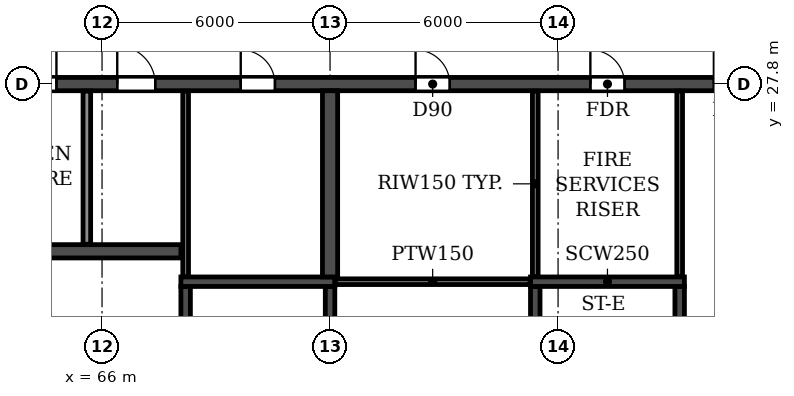
"""IFC4 building model, lengths in metres.
Left out: names, types, materials, properties, quantities, classifications, styles, units other than length and angle.
Written with IfcOpenShell. Run it as: python <this file> out.ifc"""

import sys

from ifc_helpers import new_model, si_unit, direction, frame, frame_2d, origin, place, context, subcontext, project, spatial, rectangle, extrude, element, fill, save


model = new_model("IFC4")
c1 = context("Model", 3, precision=1e-05, world=origin(), true_north=direction((0.0, 1.0)))
c2 = subcontext(c1, "Body", "Model", "MODEL_VIEW")
j1 = project(units=[si_unit("LENGTHUNIT", "METRE"), si_unit("PLANEANGLEUNIT", "RADIAN")], contexts=[c1])
p1 = place(None, origin())
s1 = spatial("IfcSite", under=j1, at=p1, CompositionType="ELEMENT")
p2 = place(p1, origin())
s2 = spatial("IfcBuilding", under=s1, at=p2, CompositionType="ELEMENT")
p3 = place(p2, frame((0.0, 0.0, 261.0)))
s3 = spatial("IfcBuildingStorey", under=s2, at=p3, CompositionType="ELEMENT", Elevation=261.0)
p4 = place(p3, frame((18.2, 27.8, 0.0), z_axis=(0.0, 0.0, 1.0), x_axis=(1.0, 0.0, 0.0)))
e1 = element("IfcWall", 1, at=p4, inside=s3, PredefinedType="SOLIDWALL", context=c2, shape_type="SweptSolid", body=[
    extrude(rectangle(XDim=65.6, YDim=0.35, at=frame_2d((32.8, 0.0))), origin(), (0.0, 0.0, 1.0), 5.7),
])
p5 = place(p4, frame((0.7, 0.0, 0.0)))
e2 = element("IfcOpeningElement", 2, at=p5, cuts=e1, PredefinedType="OPENING", context=c2, shape_type="SweptSolid", body=[
    extrude(rectangle(XDim=1.0, YDim=2.1, at=frame_2d((0.5, 1.05))), frame((0.0, 0.185, 0.0), z_axis=(0.0, -1.0, 0.0), x_axis=(1.0, 0.0, 0.0)), (0.0, 0.0, 1.0), 0.37),
])
p6 = place(p4, frame((4.05, 0.0, 0.0)))
e3 = element("IfcOpeningElement", 3, at=p6, cuts=e1, PredefinedType="OPENING", context=c2, shape_type="SweptSolid", body=[
    extrude(rectangle(XDim=0.9, YDim=2.1, at=frame_2d((0.45, 1.05))), frame((0.0, 0.185, 0.0), z_axis=(0.0, -1.0, 0.0), x_axis=(1.0, 0.0, 0.0)), (0.0, 0.0, 1.0), 0.37),
])
p7 = place(p4, frame((8.65, 0.0, 0.0)))
e4 = element("IfcOpeningElement", 4, at=p7, cuts=e1, PredefinedType="OPENING", context=c2, shape_type="SweptSolid", body=[
    extrude(rectangle(XDim=0.9, YDim=2.1, at=frame_2d((0.45, 1.05))), frame((0.0, 0.185, 0.0), z_axis=(0.0, -1.0, 0.0), x_axis=(1.0, 0.0, 0.0)), (0.0, 0.0, 1.0), 0.37),
])
p8 = place(p4, frame((13.25, 0.0, 0.0)))
e5 = element("IfcOpeningElement", 5, at=p8, cuts=e1, PredefinedType="OPENING", context=c2, shape_type="SweptSolid", body=[
    extrude(rectangle(XDim=0.9, YDim=2.1, at=frame_2d((0.45, 1.05))), frame((0.0, 0.185, 0.0), z_axis=(0.0, -1.0, 0.0), x_axis=(1.0, 0.0, 0.0)), (0.0, 0.0, 1.0), 0.37),
])
p9 = place(p4, frame((16.4, 0.0, 0.0)))
e6 = element("IfcOpeningElement", 6, at=p9, cuts=e1, PredefinedType="OPENING", context=c2, shape_type="SweptSolid", body=[
    extrude(rectangle(XDim=1.0, YDim=2.1, at=frame_2d((0.5, 1.05))), frame((0.0, 0.185, 0.0), z_axis=(0.0, -1.0, 0.0), x_axis=(1.0, 0.0, 0.0)), (0.0, 0.0, 1.0), 0.37),
])
p10 = place(p4, frame((21.6, 0.0, 0.0)))
e7 = element("IfcOpeningElement", 7, at=p10, cuts=e1, PredefinedType="OPENING", context=c2, shape_type="SweptSolid", body=[
    extrude(rectangle(XDim=1.0, YDim=2.1, at=frame_2d((0.5, 1.05))), frame((0.0, 0.185, 0.0), z_axis=(0.0, -1.0, 0.0), x_axis=(1.0, 0.0, 0.0)), (0.0, 0.0, 1.0), 0.37),
])
p11 = place(p4, frame((29.4, 0.0, 0.0)))
e8 = element("IfcOpeningElement", 8, at=p11, cuts=e1, PredefinedType="OPENING", context=c2, shape_type="SweptSolid", body=[
    extrude(rectangle(XDim=1.0, YDim=2.1, at=frame_2d((0.5, 1.05))), frame((0.0, 0.185, 0.0), z_axis=(0.0, -1.0, 0.0), x_axis=(1.0, 0.0, 0.0)), (0.0, 0.0, 1.0), 0.37),
])
p12 = place(p4, frame((32.3, 0.0, 0.0)))
e9 = element("IfcOpeningElement", 9, at=p12, cuts=e1, PredefinedType="OPENING", context=c2, shape_type="SweptSolid", body=[
    extrude(rectangle(XDim=1.0, YDim=2.1, at=frame_2d((0.5, 1.05))), frame((0.0, 0.185, 0.0), z_axis=(0.0, -1.0, 0.0), x_axis=(1.0, 0.0, 0.0)), (0.0, 0.0, 1.0), 0.37),
])
p13 = place(p4, frame((35.2, 0.0, 0.0)))
e10 = element("IfcOpeningElement", 10, at=p13, cuts=e1, PredefinedType="OPENING", context=c2, shape_type="SweptSolid", body=[
    extrude(rectangle(XDim=1.0, YDim=2.1, at=frame_2d((0.5, 1.05))), frame((0.0, 0.185, 0.0), z_axis=(0.0, -1.0, 0.0), x_axis=(1.0, 0.0, 0.0)), (0.0, 0.0, 1.0), 0.37),
])
p14 = place(p4, frame((37.8, 0.0, 0.0)))
e11 = element("IfcOpeningElement", 11, at=p14, cuts=e1, PredefinedType="OPENING", context=c2, shape_type="SweptSolid", body=[
    extrude(rectangle(XDim=1.0, YDim=2.1, at=frame_2d((0.5, 1.05))), frame((0.0, 0.185, 0.0), z_axis=(0.0, -1.0, 0.0), x_axis=(1.0, 0.0, 0.0)), (0.0, 0.0, 1.0), 0.37),
])
p15 = place(p4, frame((41.7, 0.0, 0.0)))
e12 = element("IfcOpeningElement", 12, at=p15, cuts=e1, PredefinedType="OPENING", context=c2, shape_type="SweptSolid", body=[
    extrude(rectangle(XDim=1.0, YDim=2.1, at=frame_2d((0.5, 1.05))), frame((0.0, 0.185, 0.0), z_axis=(0.0, -1.0, 0.0), x_axis=(1.0, 0.0, 0.0)), (0.0, 0.0, 1.0), 0.37),
])
p16 = place(p4, frame((45.6, 0.0, 0.0)))
e13 = element("IfcOpeningElement", 13, at=p16, cuts=e1, PredefinedType="OPENING", context=c2, shape_type="SweptSolid", body=[
    extrude(rectangle(XDim=1.0, YDim=2.1, at=frame_2d((0.5, 1.05))), frame((0.0, 0.185, 0.0), z_axis=(0.0, -1.0, 0.0), x_axis=(1.0, 0.0, 0.0)), (0.0, 0.0, 1.0), 0.37),
])
p17 = place(p4, frame((48.2, 0.0, 0.0)))
e14 = element("IfcOpeningElement", 14, at=p17, cuts=e1, PredefinedType="OPENING", context=c2, shape_type="SweptSolid", body=[
    extrude(rectangle(XDim=1.0, YDim=2.1, at=frame_2d((0.5, 1.05))), frame((0.0, 0.185, 0.0), z_axis=(0.0, -1.0, 0.0), x_axis=(1.0, 0.0, 0.0)), (0.0, 0.0, 1.0), 0.37),
])
p18 = place(p4, frame((51.45, 0.0, 0.0)))
e15 = element("IfcOpeningElement", 15, at=p18, cuts=e1, PredefinedType="OPENING", context=c2, shape_type="SweptSolid", body=[
    extrude(rectangle(XDim=0.9, YDim=2.1, at=frame_2d((0.45, 1.05))), frame((0.0, 0.185, 0.0), z_axis=(0.0, -1.0, 0.0), x_axis=(1.0, 0.0, 0.0)), (0.0, 0.0, 1.0), 0.37),
])
p19 = place(p4, frame((56.05, 0.0, 0.0)))
e16 = element("IfcOpeningElement", 16, at=p19, cuts=e1, PredefinedType="OPENING", context=c2, shape_type="SweptSolid", body=[
    extrude(rectangle(XDim=0.9, YDim=2.1, at=frame_2d((0.45, 1.05))), frame((0.0, 0.185, 0.0), z_axis=(0.0, -1.0, 0.0), x_axis=(1.0, 0.0, 0.0)), (0.0, 0.0, 1.0), 0.37),
])
p20 = place(p4, frame((60.65, 0.0, 0.0)))
e17 = element("IfcOpeningElement", 17, at=p20, cuts=e1, PredefinedType="OPENING", context=c2, shape_type="SweptSolid", body=[
    extrude(rectangle(XDim=0.9, YDim=2.1, at=frame_2d((0.45, 1.05))), frame((0.0, 0.185, 0.0), z_axis=(0.0, -1.0, 0.0), x_axis=(1.0, 0.0, 0.0)), (0.0, 0.0, 1.0), 0.37),
])
p21 = place(p4, frame((63.9, 0.0, 0.0)))
e18 = element("IfcOpeningElement", 18, at=p21, cuts=e1, PredefinedType="OPENING", context=c2, shape_type="SweptSolid", body=[
    extrude(rectangle(XDim=1.0, YDim=2.1, at=frame_2d((0.5, 1.05))), frame((0.0, 0.185, 0.0), z_axis=(0.0, -1.0, 0.0), x_axis=(1.0, 0.0, 0.0)), (0.0, 0.0, 1.0), 0.37),
])
p22 = place(p3, frame((33.925, 23.4, 0.0), z_axis=(0.0, 0.0, 1.0), x_axis=(1.0, 0.0, 0.0)))
e19 = element("IfcWall", 19, at=p22, inside=s3, PredefinedType="SOLIDWALL", context=c2, shape_type="SweptSolid", body=[
    extrude(rectangle(XDim=34.15, YDim=0.35, at=frame_2d((17.075, 0.0))), origin(), (0.0, 0.0, 1.0), 5.7),
])
p23 = place(p22, frame((16.175, 0.0, 0.0)))
e20 = element("IfcOpeningElement", 20, at=p23, cuts=e19, PredefinedType="OPENING", context=c2, shape_type="SweptSolid", body=[
    extrude(rectangle(XDim=1.8, YDim=2.1, at=frame_2d((0.9, 1.05))), frame((0.0, 0.185, 0.0), z_axis=(0.0, -1.0, 0.0), x_axis=(1.0, 0.0, 0.0)), (0.0, 0.0, 1.0), 0.37),
])
p24 = place(p22, frame((0.625, 0.0, 0.0)))
e21 = element("IfcOpeningElement", 21, at=p24, cuts=e19, PredefinedType="OPENING", context=c2, shape_type="SweptSolid", body=[
    extrude(rectangle(XDim=1.1, YDim=2.1, at=frame_2d((0.55, 1.05))), frame((0.0, 0.185, 0.0), z_axis=(0.0, -1.0, 0.0), x_axis=(1.0, 0.0, 0.0)), (0.0, 0.0, 1.0), 0.37),
])
p25 = place(p22, frame((3.225, 0.0, 0.0)))
e22 = element("IfcOpeningElement", 22, at=p25, cuts=e19, PredefinedType="OPENING", context=c2, shape_type="SweptSolid", body=[
    extrude(rectangle(XDim=1.1, YDim=2.1, at=frame_2d((0.55, 1.05))), frame((0.0, 0.185, 0.0), z_axis=(0.0, -1.0, 0.0), x_axis=(1.0, 0.0, 0.0)), (0.0, 0.0, 1.0), 0.37),
])
p26 = place(p22, frame((5.825, 0.0, 0.0)))
e23 = element("IfcOpeningElement", 23, at=p26, cuts=e19, PredefinedType="OPENING", context=c2, shape_type="SweptSolid", body=[
    extrude(rectangle(XDim=1.1, YDim=2.1, at=frame_2d((0.55, 1.05))), frame((0.0, 0.185, 0.0), z_axis=(0.0, -1.0, 0.0), x_axis=(1.0, 0.0, 0.0)), (0.0, 0.0, 1.0), 0.37),
])
p27 = place(p22, frame((8.425, 0.0, 0.0)))
e24 = element("IfcOpeningElement", 24, at=p27, cuts=e19, PredefinedType="OPENING", context=c2, shape_type="SweptSolid", body=[
    extrude(rectangle(XDim=1.1, YDim=2.1, at=frame_2d((0.55, 1.05))), frame((0.0, 0.185, 0.0), z_axis=(0.0, -1.0, 0.0), x_axis=(1.0, 0.0, 0.0)), (0.0, 0.0, 1.0), 0.37),
])
p28 = place(p22, frame((11.025, 0.0, 0.0)))
e25 = element("IfcOpeningElement", 25, at=p28, cuts=e19, PredefinedType="OPENING", context=c2, shape_type="SweptSolid", body=[
    extrude(rectangle(XDim=1.1, YDim=2.1, at=frame_2d((0.55, 1.05))), frame((0.0, 0.185, 0.0), z_axis=(0.0, -1.0, 0.0), x_axis=(1.0, 0.0, 0.0)), (0.0, 0.0, 1.0), 0.37),
])
p29 = place(p22, frame((13.625, 0.0, 0.0)))
e26 = element("IfcOpeningElement", 26, at=p29, cuts=e19, PredefinedType="OPENING", context=c2, shape_type="SweptSolid", body=[
    extrude(rectangle(XDim=1.1, YDim=2.1, at=frame_2d((0.55, 1.05))), frame((0.0, 0.185, 0.0), z_axis=(0.0, -1.0, 0.0), x_axis=(1.0, 0.0, 0.0)), (0.0, 0.0, 1.0), 0.37),
])
p30 = place(p22, frame((24.625, 0.0, 0.0)))
e27 = element("IfcOpeningElement", 27, at=p30, cuts=e19, PredefinedType="OPENING", context=c2, shape_type="SweptSolid", body=[
    extrude(rectangle(XDim=1.1, YDim=2.1, at=frame_2d((0.55, 1.05))), frame((0.0, 0.185, 0.0), z_axis=(0.0, -1.0, 0.0), x_axis=(1.0, 0.0, 0.0)), (0.0, 0.0, 1.0), 0.37),
])
p31 = place(p22, frame((27.225, 0.0, 0.0)))
e28 = element("IfcOpeningElement", 28, at=p31, cuts=e19, PredefinedType="OPENING", context=c2, shape_type="SweptSolid", body=[
    extrude(rectangle(XDim=1.1, YDim=2.1, at=frame_2d((0.55, 1.05))), frame((0.0, 0.185, 0.0), z_axis=(0.0, -1.0, 0.0), x_axis=(1.0, 0.0, 0.0)), (0.0, 0.0, 1.0), 0.37),
])
p32 = place(p3, frame((72.0, 22.725, 0.0), z_axis=(0.0, 0.0, 1.0), x_axis=(0.0, 1.0, 0.0)))
e29 = element("IfcWall", 29, at=p32, inside=s3, PredefinedType="SOLIDWALL", context=c2, shape_type="SweptSolid", body=[
    extrude(rectangle(XDim=4.9, YDim=0.4, at=frame_2d((2.45, 0.0))), origin(), (0.0, 0.0, 1.0), 5.7),
])
p33 = place(p3, frame((68.2, 14.775, 0.0), z_axis=(0.0, 0.0, 1.0), x_axis=(0.0, 1.0, 0.0)))
e30 = element("IfcWall", 30, at=p33, inside=s3, PredefinedType="SOLIDWALL", context=c2, shape_type="SweptSolid", body=[
    extrude(rectangle(XDim=7.7, YDim=0.25, at=frame_2d((3.85, 0.0))), origin(), (0.0, 0.0, 1.0), 5.7),
])
p34 = place(p33, frame((0.525, 0.0, 0.0)))
e31 = element("IfcOpeningElement", 31, at=p34, cuts=e30, PredefinedType="OPENING", context=c2, shape_type="SweptSolid", body=[
    extrude(rectangle(XDim=1.0, YDim=2.1, at=frame_2d((0.5, 1.05))), frame((0.0, 0.135, 0.0), z_axis=(0.0, -1.0, 0.0), x_axis=(1.0, 0.0, 0.0)), (0.0, 0.0, 1.0), 0.27),
])
p35 = place(p3, frame((72.0, 14.775, 0.0), z_axis=(0.0, 0.0, 1.0), x_axis=(0.0, 1.0, 0.0)))
e32 = element("IfcWall", 32, at=p35, inside=s3, PredefinedType="SOLIDWALL", context=c2, shape_type="SweptSolid", body=[
    extrude(rectangle(XDim=7.7, YDim=0.25, at=frame_2d((3.85, 0.0))), origin(), (0.0, 0.0, 1.0), 5.7),
])
p36 = place(p3, frame((68.075, 22.6, 0.0), z_axis=(0.0, 0.0, 1.0), x_axis=(1.0, 0.0, 0.0)))
e33 = element("IfcWall", 33, at=p36, inside=s3, PredefinedType="SOLIDWALL", context=c2, shape_type="SweptSolid", body=[
    extrude(rectangle(XDim=4.05, YDim=0.25, at=frame_2d((2.025, 0.0))), origin(), (0.0, 0.0, 1.0), 5.7),
])
p37 = place(p3, frame((77.4, 14.775, 0.0), z_axis=(0.0, 0.0, 1.0), x_axis=(0.0, 1.0, 0.0)))
e34 = element("IfcWall", 34, at=p37, inside=s3, PredefinedType="SOLIDWALL", context=c2, shape_type="SweptSolid", body=[
    extrude(rectangle(XDim=7.7, YDim=0.25, at=frame_2d((3.85, 0.0))), origin(), (0.0, 0.0, 1.0), 5.7),
])
p38 = place(p3, frame((81.2, 14.775, 0.0), z_axis=(0.0, 0.0, 1.0), x_axis=(0.0, 1.0, 0.0)))
e35 = element("IfcWall", 35, at=p38, inside=s3, PredefinedType="SOLIDWALL", context=c2, shape_type="SweptSolid", body=[
    extrude(rectangle(XDim=7.7, YDim=0.25, at=frame_2d((3.85, 0.0))), origin(), (0.0, 0.0, 1.0), 5.7),
])
p39 = place(p38, frame((0.525, 0.0, 0.0)))
e36 = element("IfcOpeningElement", 36, at=p39, cuts=e35, PredefinedType="OPENING", context=c2, shape_type="SweptSolid", body=[
    extrude(rectangle(XDim=1.0, YDim=2.1, at=frame_2d((0.5, 1.05))), frame((0.0, 0.135, 0.0), z_axis=(0.0, -1.0, 0.0), x_axis=(1.0, 0.0, 0.0)), (0.0, 0.0, 1.0), 0.27),
])
p40 = place(p3, frame((77.275, 22.6, 0.0), z_axis=(0.0, 0.0, 1.0), x_axis=(1.0, 0.0, 0.0)))
e37 = element("IfcWall", 37, at=p40, inside=s3, PredefinedType="SOLIDWALL", context=c2, shape_type="SweptSolid", body=[
    extrude(rectangle(XDim=4.05, YDim=0.25, at=frame_2d((2.025, 0.0))), origin(), (0.0, 0.0, 1.0), 5.7),
])
p41 = place(p3, frame((72.135, 22.6, 0.0), z_axis=(0.0, 0.0, 1.0), x_axis=(1.0, 0.0, 0.0)))
e38 = element("IfcWall", 38, at=p41, inside=s3, PredefinedType="PARTITIONING", context=c2, shape_type="SweptSolid", body=[
    extrude(rectangle(XDim=5.13, YDim=0.15, at=frame_2d((2.565, 0.0))), origin(), (0.0, 0.0, 1.0), 5.7),
])
p42 = place(p3, frame((65.6, 23.585, 0.0), z_axis=(0.0, 0.0, 1.0), x_axis=(0.0, 1.0, 0.0)))
e39 = element("IfcWall", 39, at=p42, inside=s3, PredefinedType="PARTITIONING", context=c2, shape_type="SweptSolid", body=[
    extrude(rectangle(XDim=4.03, YDim=0.2, at=frame_2d((2.015, 0.0))), origin(), (0.0, 0.0, 1.0), 5.7),
])
for number, where, z_axis, x_axis in (
    (40, (68.2, 22.735, 0.0), (0.0, 0.0, 1.0), (0.0, 1.0, 0.0)),
    (41, (77.4, 22.735, 0.0), (0.0, 0.0, 1.0), (0.0, 1.0, 0.0)),
    (42, (81.2, 22.735, 0.0), (0.0, 0.0, 1.0), (0.0, 1.0, 0.0)),
):
    element("IfcWall", number, at=place(p3, frame(where, z_axis=z_axis, x_axis=x_axis)), inside=s3, PredefinedType="PARTITIONING", context=c2, shape_type="SweptSolid", body=[
        extrude(rectangle(XDim=4.88, YDim=0.15, at=frame_2d((2.44, 0.0))), origin(), (0.0, 0.0, 1.0), 5.7),
    ])
p43 = place(p16, origin())
e43 = element("IfcDoor", 43, at=p43, inside=s3, OperationType="SINGLE_SWING_RIGHT", PredefinedType="DOOR", context=c2, shape_type="SweptSolid", body=[
    extrude(rectangle(XDim=1.0, YDim=2.1, at=frame_2d((0.5, 1.05))), frame((0.0, 0.025, 0.0), z_axis=(0.0, -1.0, 0.0), x_axis=(1.0, 0.0, 0.0)), (0.0, 0.0, 1.0), 0.05),
])
fill(e13, e43)
p44 = place(p17, origin())
e44 = element("IfcDoor", 44, at=p44, inside=s3, OperationType="SINGLE_SWING_LEFT", PredefinedType="DOOR", context=c2, shape_type="SweptSolid", body=[
    extrude(rectangle(XDim=1.0, YDim=2.1, at=frame_2d((0.5, 1.05))), frame((0.0, 0.025, 0.0), z_axis=(0.0, -1.0, 0.0), x_axis=(1.0, 0.0, 0.0)), (0.0, 0.0, 1.0), 0.05),
])
fill(e14, e44)
p45 = place(p18, origin())
e45 = element("IfcDoor", 45, at=p45, inside=s3, OperationType="SINGLE_SWING_LEFT", PredefinedType="DOOR", context=c2, shape_type="SweptSolid", body=[
    extrude(rectangle(XDim=0.9, YDim=2.1, at=frame_2d((0.45, 1.05))), frame((0.0, 0.025, 0.0), z_axis=(0.0, -1.0, 0.0), x_axis=(1.0, 0.0, 0.0)), (0.0, 0.0, 1.0), 0.05),
])
fill(e15, e45)
p46 = place(p19, origin())
e46 = element("IfcDoor", 46, at=p46, inside=s3, OperationType="SINGLE_SWING_LEFT", PredefinedType="DOOR", context=c2, shape_type="SweptSolid", body=[
    extrude(rectangle(XDim=0.9, YDim=2.1, at=frame_2d((0.45, 1.05))), frame((0.0, 0.025, 0.0), z_axis=(0.0, -1.0, 0.0), x_axis=(1.0, 0.0, 0.0)), (0.0, 0.0, 1.0), 0.05),
])
fill(e16, e46)
p47 = place(p20, origin())
e47 = element("IfcDoor", 47, at=p47, inside=s3, OperationType="SINGLE_SWING_LEFT", PredefinedType="DOOR", context=c2, shape_type="SweptSolid", body=[
    extrude(rectangle(XDim=0.9, YDim=2.1, at=frame_2d((0.45, 1.05))), frame((0.0, 0.025, 0.0), z_axis=(0.0, -1.0, 0.0), x_axis=(1.0, 0.0, 0.0)), (0.0, 0.0, 1.0), 0.05),
])
fill(e17, e47)
p48 = place(p21, origin())
e48 = element("IfcDoor", 48, at=p48, inside=s3, OperationType="SINGLE_SWING_LEFT", PredefinedType="DOOR", context=c2, shape_type="SweptSolid", body=[
    extrude(rectangle(XDim=1.0, YDim=2.1, at=frame_2d((0.5, 1.05))), frame((0.0, 0.025, 0.0), z_axis=(0.0, -1.0, 0.0), x_axis=(1.0, 0.0, 0.0)), (0.0, 0.0, 1.0), 0.05),
])
fill(e18, e48)
save(model, sys.argv[1])
